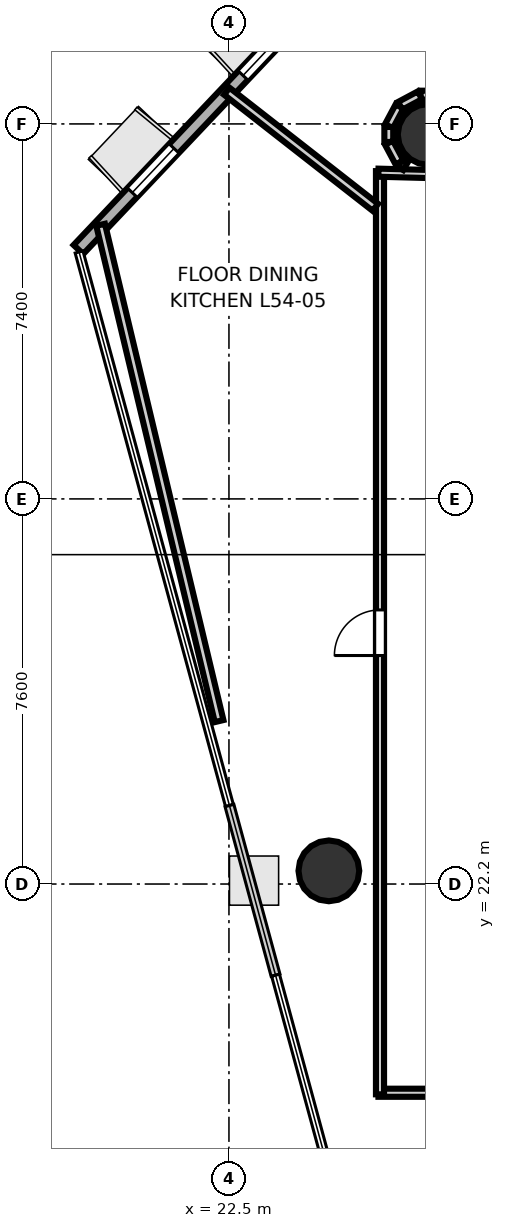
"""IFC4 building model, lengths in metres.
Left out: names, types, materials, properties, quantities, classifications, styles, units other than length and angle.
Written with IfcOpenShell. Run it as: python <this file> out.ifc"""

import sys

from ifc_helpers import new_model, si_unit, direction, frame, frame_2d, origin, origin_2d, place, context, subcontext, project, spatial, rectangle, hollow_circle, extrude, element, fill, save


model = new_model("IFC4")
c1 = context("Model", 3, precision=1e-05, world=origin(), true_north=direction((0.0, 1.0)))
c2 = subcontext(c1, "Body", "Model", "MODEL_VIEW")
j1 = project(units=[si_unit("LENGTHUNIT", "METRE"), si_unit("PLANEANGLEUNIT", "RADIAN")], contexts=[c1])
p1 = place(None, origin())
s1 = spatial("IfcSite", under=j1, at=p1, CompositionType="ELEMENT")
p2 = place(p1, origin())
s2 = spatial("IfcBuilding", under=s1, at=p2, CompositionType="ELEMENT")
p3 = place(p2, frame((0.0, 0.0, 211.4)))
s3 = spatial("IfcBuildingStorey", under=s2, at=p3, CompositionType="ELEMENT", Elevation=211.4)
for number, where, z_axis, x_axis in (
    (1, (26.431, 36.992, 0.0), (0.0, 0.0, 1.0), (1.0, 0.0, 0.0)),
    (2, (24.472, 22.46, 0.0), (0.0, 0.0, 1.0), (1.0, 0.0, 0.0)),
):
    element("IfcColumn", number, at=place(p3, frame(where, z_axis=z_axis, x_axis=x_axis)), inside=s3, PredefinedType="COLUMN", context=c2, shape_type="SweptSolid", body=[
        extrude(hollow_circle(Radius=0.6, WallThickness=0.03, at=origin_2d()), origin(), (0.0, 0.0, 1.0), 3.7),
    ])
p4 = place(p3, frame((24.446, 39.918, 0.0), z_axis=(0.0, 0.0, 1.0), x_axis=(-0.687265560939, -0.726406255994, 0.0)))
e3 = element("IfcWall", 3, at=p4, inside=s3, PredefinedType="SOLIDWALL", context=c2, shape_type="SweptSolid", body=[
    extrude(rectangle(XDim=7.155, YDim=0.26, at=frame_2d((3.577, 0.0))), origin(), (0.0, 0.0, 1.0), 3.52),
])
p5 = place(p4, frame((1.226, 0.0, 0.9)))
e4 = element("IfcOpeningElement", 4, at=p5, cuts=e3, PredefinedType="OPENING", context=c2, shape_type="SweptSolid", body=[
    extrude(rectangle(XDim=1.2, YDim=2.0, at=frame_2d((0.6, 1.0))), frame((0.0, 0.14, 0.0), z_axis=(0.0, -1.0, 0.0), x_axis=(1.0, 0.0, 0.0)), (0.0, 0.0, 1.0), 0.28),
])
p6 = place(p4, frame((4.408, 0.0, 0.9)))
e5 = element("IfcOpeningElement", 5, at=p6, cuts=e3, PredefinedType="OPENING", context=c2, shape_type="SweptSolid", body=[
    extrude(rectangle(XDim=1.2, YDim=2.0, at=frame_2d((0.6, 1.0))), frame((0.0, 0.14, 0.0), z_axis=(0.0, -1.0, 0.0), x_axis=(1.0, 0.0, 0.0)), (0.0, 0.0, 1.0), 0.28),
])
p7 = place(p3, frame((28.4, 18.081, 0.0), z_axis=(0.0, 0.0, 1.0), x_axis=(-1.0, 0.0, 0.0)))
e6 = element("IfcWall", 6, at=p7, inside=s3, PredefinedType="PARTITIONING", context=c2, shape_type="SweptSolid", body=[
    extrude(rectangle(XDim=2.95, YDim=0.16, at=frame_2d((1.475, 0.0))), origin(), (0.0, 0.0, 1.0), 2.84),
])
p8 = place(p3, frame((25.481, 18.05, 0.0), z_axis=(0.0, 0.0, 1.0), x_axis=(0.0, 1.0, 0.0)))
e7 = element("IfcWall", 7, at=p8, inside=s3, PredefinedType="PARTITIONING", context=c2, shape_type="SweptSolid", body=[
    extrude(rectangle(XDim=18.219, YDim=0.16, at=frame_2d((9.109, 0.0))), origin(), (0.0, 0.0, 1.0), 2.84),
])
p9 = place(p8, frame((8.659, 0.0, 0.0)))
e8 = element("IfcOpeningElement", 8, at=p9, cuts=e7, PredefinedType="OPENING", context=c2, shape_type="SweptSolid", body=[
    extrude(rectangle(XDim=0.9, YDim=2.1, at=frame_2d((0.45, 1.05))), frame((0.0, 0.09, 0.0), z_axis=(0.0, -1.0, 0.0), x_axis=(1.0, 0.0, 0.0)), (0.0, 0.0, 1.0), 0.18),
])
p10 = place(p3, frame((25.449, 36.238, 0.0), z_axis=(0.0, 0.0, 1.0), x_axis=(0.999651698073, -0.026390955635, 0.0)))
e9 = element("IfcWall", 9, at=p10, inside=s3, PredefinedType="PARTITIONING", context=c2, shape_type="SweptSolid", body=[
    extrude(rectangle(XDim=1.295, YDim=0.16, at=frame_2d((0.647, 0.0))), origin(), (0.0, 0.0, 1.0), 2.84),
])
p11 = place(p3, frame((26.579, 37.768, 0.0), z_axis=(0.0, 0.0, 1.0), x_axis=(-1.0, 0.0, 0.0)))
e10 = element("IfcWall", 10, at=p11, inside=s3, PredefinedType="PLUMBINGWALL", context=c2, shape_type="SweptSolid", body=[
    extrude(rectangle(XDim=0.297, YDim=0.175, at=frame_2d((0.148, 0.0))), origin(), (0.0, 0.0, 1.0), 2.84),
])
for number, where, z_axis, x_axis in (
    (11, (26.268, 37.765, 0.0), (0.0, 0.0, 1.0), (-0.882, -0.471, 0.0)),
    (12, (25.866, 37.544, 0.0), (0.0, 0.0, 1.0), (-0.471, -0.882, 0.0)),
):
    element("IfcWall", number, at=place(p3, frame(where, z_axis=z_axis, x_axis=x_axis)), inside=s3, PredefinedType="PLUMBINGWALL", context=c2, shape_type="SweptSolid", body=[
        extrude(rectangle(XDim=0.441, YDim=0.175, at=frame_2d((0.221, 0.0))), origin(), (0.0, 0.0, 1.0), 2.84),
    ])
p12 = place(p3, frame((25.655, 37.14, 0.0), z_axis=(0.0, 0.0, 1.0), x_axis=(0.0, -1.0, 0.0)))
e13 = element("IfcWall", 13, at=p12, inside=s3, PredefinedType="PLUMBINGWALL", context=c2, shape_type="SweptSolid", body=[
    extrude(rectangle(XDim=0.297, YDim=0.175, at=frame_2d((0.148, 0.0))), origin(), (0.0, 0.0, 1.0), 2.84),
])
p13 = place(p3, frame((25.658, 36.829, 0.0), z_axis=(0.0, 0.0, 1.0), x_axis=(0.471392110461, -0.881923737177, 0.0)))
e14 = element("IfcWall", 14, at=p13, inside=s3, PredefinedType="PLUMBINGWALL", context=c2, shape_type="SweptSolid", body=[
    extrude(rectangle(XDim=0.441, YDim=0.175, at=frame_2d((0.221, 0.0))), origin(), (0.0, 0.0, 1.0), 2.84),
])
p14 = place(p3, frame((25.878, 36.428, 0.0), z_axis=(0.0, 0.0, 1.0), x_axis=(0.860098766691, -0.510127544382, 0.0)))
e15 = element("IfcWall", 15, at=p14, inside=s3, PredefinedType="PLUMBINGWALL", context=c2, shape_type="SweptSolid", body=[
    extrude(rectangle(XDim=0.124, YDim=0.175, at=frame_2d((0.062, 0.0))), origin(), (0.0, 0.0, 1.0), 2.84),
])
p15 = place(p3, frame((25.389, 35.555, 0.0), z_axis=(0.0, 0.0, 1.0), x_axis=(-0.788025368562, 0.615642768578, 0.0)))
e16 = element("IfcWall", 16, at=p15, inside=s3, PredefinedType="PLUMBINGWALL", context=c2, shape_type="SweptSolid", body=[
    extrude(rectangle(XDim=3.72, YDim=0.175, at=frame_2d((1.86, 0.0))), origin(), (0.0, 0.0, 1.0), 2.84),
])
p16 = place(p3, frame((22.306, 25.415, 0.0), z_axis=(0.0, 0.0, 1.0), x_axis=(-0.232253113471, 0.972655381563, 0.0)))
e17 = element("IfcWall", 17, at=p16, inside=s3, PredefinedType="PLUMBINGWALL", context=c2, shape_type="SweptSolid", body=[
    extrude(rectangle(XDim=10.069, YDim=0.175, at=frame_2d((5.035, 0.0))), origin(), (0.0, 0.0, 1.0), 2.84),
])
p17 = place(p9, origin())
e18 = element("IfcDoor", 18, at=p17, inside=s3, OperationType="SINGLE_SWING_LEFT", PredefinedType="DOOR", context=c2, shape_type="SweptSolid", body=[
    extrude(rectangle(XDim=0.9, YDim=2.1, at=frame_2d((0.45, 1.05))), frame((0.0, 0.025, 0.0), z_axis=(0.0, -1.0, 0.0), x_axis=(1.0, 0.0, 0.0)), (0.0, 0.0, 1.0), 0.05),
])
fill(e8, e18)
p18 = place(p5, origin())
e19 = element("IfcWindow", 19, at=p18, inside=s3, PartitioningType="SINGLE_PANEL", PredefinedType="WINDOW", context=c2, shape_type="SweptSolid", body=[
    extrude(rectangle(XDim=1.2, YDim=2.0, at=frame_2d((0.6, 1.0))), frame((0.0, 0.03, 0.0), z_axis=(0.0, -1.0, 0.0), x_axis=(1.0, 0.0, 0.0)), (0.0, 0.0, 1.0), 0.06),
])
fill(e4, e19)
p19 = place(p6, origin())
e20 = element("IfcWindow", 20, at=p19, inside=s3, PartitioningType="SINGLE_PANEL", PredefinedType="WINDOW", context=c2, shape_type="SweptSolid", body=[
    extrude(rectangle(XDim=1.2, YDim=2.0, at=frame_2d((0.6, 1.0))), frame((0.0, 0.03, 0.0), z_axis=(0.0, -1.0, 0.0), x_axis=(1.0, 0.0, 0.0)), (0.0, 0.0, 1.0), 0.06),
])
fill(e5, e20)
save(model, sys.argv[1])
